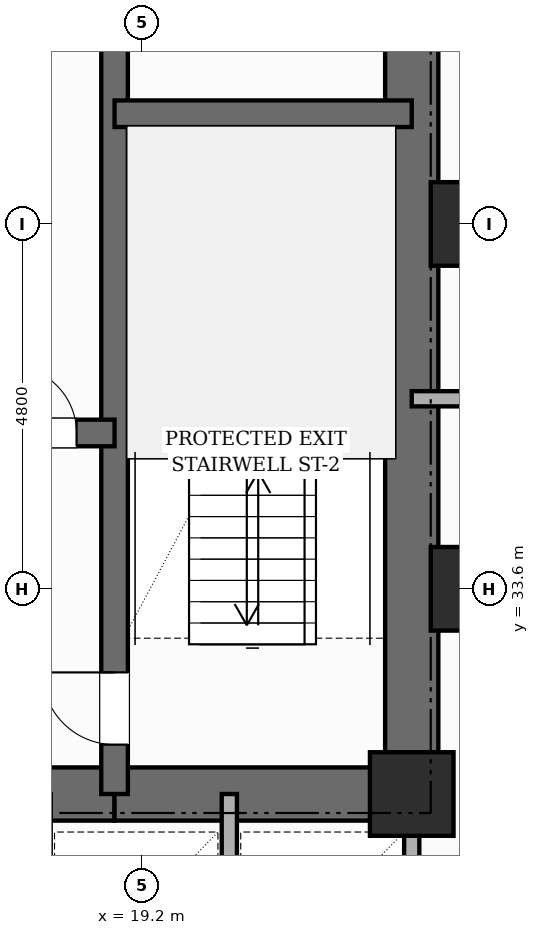
"""IFC4 building model, lengths in metres.
Left out: names, types, materials, properties, quantities, classifications, styles, units other than length and angle.
Written with IfcOpenShell. Run it as: python <this file> out.ifc"""

import sys

from ifc_helpers import new_model, si_unit, direction, frame, frame_2d, origin, origin_2d, place, context, subcontext, project, spatial, rectangle, extrude, element, fill, save


model = new_model("IFC4")
c1 = context("Model", 3, precision=1e-05, world=origin(), true_north=direction((0.0, 1.0)))
c2 = subcontext(c1, "Body", "Model", "MODEL_VIEW")
j1 = project(units=[si_unit("LENGTHUNIT", "METRE"), si_unit("PLANEANGLEUNIT", "RADIAN")], contexts=[c1])
p1 = place(None, origin())
s1 = spatial("IfcSite", under=j1, at=p1, CompositionType="ELEMENT")
p2 = place(p1, origin())
s2 = spatial("IfcBuilding", under=s1, at=p2, CompositionType="ELEMENT")
p3 = place(p2, frame((0.0, 0.0, 68.2)))
s3 = spatial("IfcBuildingStorey", under=s2, at=p3, CompositionType="ELEMENT", Elevation=68.2)
p4 = place(p3, frame((22.75, 30.55, 0.0), z_axis=(0.0, 0.0, 1.0), x_axis=(0.0, 1.0, 0.0)))
e1 = element("IfcWall", 1, at=p4, inside=s3, PredefinedType="SHEAR", context=c2, shape_type="SweptSolid", body=[
    extrude(rectangle(XDim=15.6, YDim=0.7, at=frame_2d((7.8, 0.0))), origin(), (0.0, 0.0, 1.0), 3.6),
])
p5 = place(p4, frame((10.8, 0.0, 0.0)))
e2 = element("IfcOpeningElement", 2, at=p5, cuts=e1, PredefinedType="OPENING", context=c2, shape_type="SweptSolid", body=[
    extrude(rectangle(XDim=1.0, YDim=2.15, at=frame_2d((0.5, 1.075))), frame((0.0, 0.36, 0.0), z_axis=(0.0, -1.0, 0.0), x_axis=(1.0, 0.0, 0.0)), (0.0, 0.0, 1.0), 0.72),
])
p6 = place(p3, frame((9.96, 30.9, 0.0), z_axis=(0.0, 0.0, 1.0), x_axis=(1.0, 0.0, 0.0)))
e3 = element("IfcWall", 3, at=p6, inside=s3, PredefinedType="SHEAR", context=c2, shape_type="SweptSolid", body=[
    extrude(rectangle(XDim=8.88, YDim=0.7, at=frame_2d((4.44, 0.0))), origin(), (0.0, 0.0, 1.0), 3.6),
])
p7 = place(p6, frame((4.09, 0.0, 0.0)))
e4 = element("IfcOpeningElement", 4, at=p7, cuts=e3, PredefinedType="OPENING", context=c2, shape_type="SweptSolid", body=[
    extrude(rectangle(XDim=1.0, YDim=2.15, at=frame_2d((0.5, 1.075))), frame((0.0, 0.36, 0.0), z_axis=(0.0, -1.0, 0.0), x_axis=(1.0, 0.0, 0.0)), (0.0, 0.0, 1.0), 0.72),
])
p8 = place(p3, frame((18.84, 30.9, 0.0), z_axis=(0.0, 0.0, 1.0), x_axis=(1.0, 0.0, 0.0)))
e5 = element("IfcWall", 5, at=p8, inside=s3, PredefinedType="SHEAR", context=c2, shape_type="SweptSolid", body=[
    extrude(rectangle(XDim=3.91, YDim=0.7, at=frame_2d((1.955, 0.0))), origin(), (0.0, 0.0, 1.0), 3.6),
])
p9 = place(p3, frame((18.84, 30.9, 0.0), z_axis=(0.0, 0.0, 1.0), x_axis=(0.0, 1.0, 0.0)))
e6 = element("IfcWall", 6, at=p9, inside=s3, PredefinedType="SHEAR", context=c2, shape_type="SweptSolid", body=[
    extrude(rectangle(XDim=14.9, YDim=0.35, at=frame_2d((7.45, 0.0))), origin(), (0.0, 0.0, 1.0), 3.6),
])
p10 = place(p9, frame((0.65, 0.0, 0.0)))
e7 = element("IfcOpeningElement", 7, at=p10, cuts=e6, PredefinedType="OPENING", context=c2, shape_type="SweptSolid", body=[
    extrude(rectangle(XDim=0.95, YDim=2.1, at=frame_2d((0.475, 1.05))), frame((0.0, 0.185, 0.0), z_axis=(0.0, -1.0, 0.0), x_axis=(1.0, 0.0, 0.0)), (0.0, 0.0, 1.0), 0.37),
])
p11 = place(p9, frame((10.45, 0.0, 0.0)))
e8 = element("IfcOpeningElement", 8, at=p11, cuts=e6, PredefinedType="OPENING", context=c2, shape_type="SweptSolid", body=[
    extrude(rectangle(XDim=1.0, YDim=2.15, at=frame_2d((0.5, 1.075))), frame((0.0, 0.185, 0.0), z_axis=(0.0, -1.0, 0.0), x_axis=(1.0, 0.0, 0.0)), (0.0, 0.0, 1.0), 0.37),
])
p12 = place(p3, frame((18.84, 39.85, 0.0), z_axis=(0.0, 0.0, 1.0), x_axis=(1.0, 0.0, 0.0)))
e9 = element("IfcWall", 9, at=p12, inside=s3, PredefinedType="SHEAR", context=c2, shape_type="SweptSolid", body=[
    extrude(rectangle(XDim=3.91, YDim=0.35, at=frame_2d((1.955, 0.0))), origin(), (0.0, 0.0, 1.0), 3.6),
])
p13 = place(p3, frame((9.96, 35.65, 0.0), z_axis=(0.0, 0.0, 1.0), x_axis=(1.0, 0.0, 0.0)))
e10 = element("IfcWall", 10, at=p13, inside=s3, PredefinedType="SHEAR", context=c2, shape_type="SweptSolid", body=[
    extrude(rectangle(XDim=8.88, YDim=0.35, at=frame_2d((4.44, 0.0))), origin(), (0.0, 0.0, 1.0), 3.6),
])
p14 = place(p13, frame((0.84, 0.0, 0.0)))
e11 = element("IfcOpeningElement", 11, at=p14, cuts=e10, PredefinedType="OPENING", context=c2, shape_type="SweptSolid", body=[
    extrude(rectangle(XDim=1.1, YDim=2.15, at=frame_2d((0.55, 1.075))), frame((0.0, 0.185, 0.0), z_axis=(0.0, -1.0, 0.0), x_axis=(1.0, 0.0, 0.0)), (0.0, 0.0, 1.0), 0.37),
])
p15 = place(p13, frame((5.24, 0.0, 0.0)))
e12 = element("IfcOpeningElement", 12, at=p15, cuts=e10, PredefinedType="OPENING", context=c2, shape_type="SweptSolid", body=[
    extrude(rectangle(XDim=1.1, YDim=2.15, at=frame_2d((0.55, 1.075))), frame((0.0, 0.185, 0.0), z_axis=(0.0, -1.0, 0.0), x_axis=(1.0, 0.0, 0.0)), (0.0, 0.0, 1.0), 0.37),
])
p16 = place(p13, frame((7.5, 0.0, 0.0)))
e13 = element("IfcOpeningElement", 13, at=p16, cuts=e10, PredefinedType="OPENING", context=c2, shape_type="SweptSolid", body=[
    extrude(rectangle(XDim=0.88, YDim=2.1, at=frame_2d((0.44, 1.05))), frame((0.0, 0.185, 0.0), z_axis=(0.0, -1.0, 0.0), x_axis=(1.0, 0.0, 0.0)), (0.0, 0.0, 1.0), 0.37),
])
for number, where, z_axis, x_axis in (
    (14, (22.75, 30.9, 0.0), (0.0, 0.0, 1.0), (1.0, 0.0, 0.0)),
    (15, (23.55, 33.6, 0.0), (0.0, 0.0, 1.0), (1.0, 0.0, 0.0)),
    (16, (23.55, 38.4, 0.0), (0.0, 0.0, 1.0), (1.0, 0.0, 0.0)),
):
    element("IfcColumn", number, at=place(p3, frame(where, z_axis=z_axis, x_axis=x_axis)), inside=s3, PredefinedType="COLUMN", context=c2, shape_type="SweptSolid", body=[
        extrude(rectangle(XDim=1.1, YDim=1.1, at=origin_2d()), origin(), (0.0, 0.0, 1.0), 3.6),
    ])
p17 = place(p3, frame((22.75, 27.9, 0.0), z_axis=(0.0, 0.0, 1.0), x_axis=(0.0, 1.0, 0.0)))
e17 = element("IfcWall", 17, at=p17, inside=s3, PredefinedType="POLYGONAL", context=c2, shape_type="SweptSolid", body=[
    extrude(rectangle(XDim=3.0, YDim=0.2, at=frame_2d((1.5, 0.0))), origin(), (0.0, 0.0, 1.0), 3.35),
])
p18 = place(p3, frame((20.35, 28.0, 0.0), z_axis=(0.0, 0.0, 1.0), x_axis=(0.0, 1.0, 0.0)))
e18 = element("IfcWall", 18, at=p18, inside=s3, PredefinedType="POLYGONAL", context=c2, shape_type="SweptSolid", body=[
    extrude(rectangle(XDim=2.9, YDim=0.2, at=frame_2d((1.45, 0.0))), origin(), (0.0, 0.0, 1.0), 3.35),
])
p19 = place(p3, frame((22.75, 36.1, 0.0), z_axis=(0.0, 0.0, 1.0), x_axis=(1.0, 0.0, 0.0)))
e19 = element("IfcWall", 19, at=p19, inside=s3, PredefinedType="PARTITIONING", context=c2, shape_type="SweptSolid", body=[
    extrude(rectangle(XDim=21.27, YDim=0.2, at=frame_2d((10.635, 0.0))), origin(), (0.0, 0.0, 1.0), 3.35),
])
p20 = place(p19, frame((1.625, 0.0, 0.0)))
e20 = element("IfcOpeningElement", 20, at=p20, cuts=e19, PredefinedType="OPENING", context=c2, shape_type="SweptSolid", body=[
    extrude(rectangle(XDim=0.98, YDim=2.18, at=frame_2d((0.49, 1.09))), frame((0.0, 0.11, 0.0), z_axis=(0.0, -1.0, 0.0), x_axis=(1.0, 0.0, 0.0)), (0.0, 0.0, 1.0), 0.22),
])
p21 = place(p19, frame((14.084, 0.0, 0.0)))
e21 = element("IfcOpeningElement", 21, at=p21, cuts=e19, PredefinedType="OPENING", context=c2, shape_type="SweptSolid", body=[
    extrude(rectangle(XDim=0.98, YDim=2.18, at=frame_2d((0.49, 1.09))), frame((0.0, 0.11, 0.0), z_axis=(0.0, -1.0, 0.0), x_axis=(1.0, 0.0, 0.0)), (0.0, 0.0, 1.0), 0.22),
])
p22 = place(p10, origin())
e22 = element("IfcDoor", 22, at=p22, inside=s3, OperationType="SINGLE_SWING_RIGHT", PredefinedType="DOOR", context=c2, shape_type="SweptSolid", body=[
    extrude(rectangle(XDim=0.95, YDim=2.1, at=frame_2d((0.475, 1.05))), frame((0.0, 0.025, 0.0), z_axis=(0.0, -1.0, 0.0), x_axis=(1.0, 0.0, 0.0)), (0.0, 0.0, 1.0), 0.05),
])
fill(e7, e22)
p23 = place(p16, origin())
e23 = element("IfcDoor", 23, at=p23, inside=s3, OperationType="SINGLE_SWING_LEFT", PredefinedType="DOOR", context=c2, shape_type="SweptSolid", body=[
    extrude(rectangle(XDim=0.88, YDim=2.1, at=frame_2d((0.44, 1.05))), frame((0.0, 0.025, 0.0), z_axis=(0.0, -1.0, 0.0), x_axis=(1.0, 0.0, 0.0)), (0.0, 0.0, 1.0), 0.05),
])
fill(e13, e23)
save(model, sys.argv[1])
